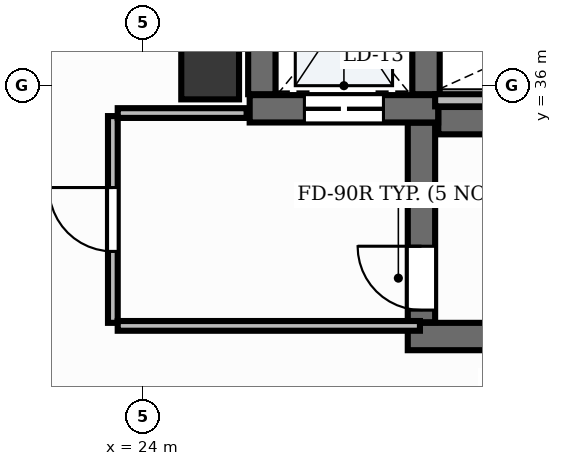
"""IFC4 building model, lengths in metres.
Left out: names, types, materials, properties, quantities, classifications, styles, units other than length and angle.
Written with IfcOpenShell. Run it as: python <this file> out.ifc"""

import sys

from ifc_helpers import new_model, si_unit, direction, frame, frame_2d, origin, origin_2d, place, context, subcontext, project, spatial, rectangle, extrude, element, fill, save


model = new_model("IFC4")
c1 = context("Model", 3, precision=1e-05, world=origin(), true_north=direction((0.0, 1.0)))
c2 = subcontext(c1, "Body", "Model", "MODEL_VIEW")
j1 = project(units=[si_unit("LENGTHUNIT", "METRE"), si_unit("PLANEANGLEUNIT", "RADIAN")], contexts=[c1])
p1 = place(None, origin())
s1 = spatial("IfcSite", under=j1, at=p1, CompositionType="ELEMENT")
p2 = place(p1, origin())
s2 = spatial("IfcBuilding", under=s1, at=p2, CompositionType="ELEMENT")
p3 = place(p2, frame((0.0, 0.0, 15.0)))
s3 = spatial("IfcBuildingStorey", under=s2, at=p3, CompositionType="ELEMENT", Elevation=15.0)
p4 = place(p3, frame((28.852, 35.425, 0.0), z_axis=(0.0, 0.0, 1.0), x_axis=(1.0, 0.0, 0.0)))
e1 = element("IfcWall", 1, at=p4, inside=s3, PredefinedType="SHEAR", context=c2, shape_type="SweptSolid", body=[
    extrude(rectangle(XDim=8.248, YDim=0.45, at=frame_2d((4.124, 0.0))), origin(), (0.0, 0.0, 1.0), 5.05),
])
p5 = place(p3, frame((28.35, 31.875, 0.0), z_axis=(0.0, 0.0, 1.0), x_axis=(1.0, 0.0, 0.0)))
e2 = element("IfcWall", 2, at=p5, inside=s3, PredefinedType="SHEAR", context=c2, shape_type="SweptSolid", body=[
    extrude(rectangle(XDim=8.75, YDim=0.45, at=frame_2d((4.375, 0.0))), origin(), (0.0, 0.0, 1.0), 5.05),
])
p6 = place(p3, frame((28.575, 32.11, 0.0), z_axis=(0.0, 0.0, 1.0), x_axis=(0.0, 1.0, 0.0)))
e3 = element("IfcWall", 3, at=p6, inside=s3, PredefinedType="SHEAR", context=c2, shape_type="SweptSolid", body=[
    extrude(rectangle(XDim=3.283, YDim=0.45, at=frame_2d((1.642, 0.0))), origin(), (0.0, 0.0, 1.0), 5.05),
])
p7 = place(p6, frame((0.2, 0.0, 0.0)))
e4 = element("IfcOpeningElement", 4, at=p7, cuts=e3, PredefinedType="OPENING", context=c2, shape_type="SweptSolid", body=[
    extrude(rectangle(XDim=1.05, YDim=2.15, at=frame_2d((0.525, 1.075))), frame((0.0, 0.24, 0.0), z_axis=(0.0, -1.0, 0.0), x_axis=(1.0, 0.0, 0.0)), (0.0, 0.0, 1.0), 0.48),
])
p8 = place(p3, frame((25.75, 35.62, 0.0), z_axis=(0.0, 0.0, 1.0), x_axis=(1.0, 0.0, 0.0)))
e5 = element("IfcWall", 5, at=p8, inside=s3, PredefinedType="SHEAR", context=c2, shape_type="SweptSolid", body=[
    extrude(rectangle(XDim=3.1, YDim=0.45, at=frame_2d((1.55, 0.0))), origin(), (0.0, 0.0, 1.0), 5.05),
])
p9 = place(p8, frame((0.9, 0.0, 0.0)))
e6 = element("IfcOpeningElement", 6, at=p9, cuts=e5, PredefinedType="OPENING", context=c2, shape_type="SweptSolid", body=[
    extrude(rectangle(XDim=1.3, YDim=2.2, at=frame_2d((0.65, 1.1))), frame((0.0, 0.24, 0.0), z_axis=(0.0, -1.0, 0.0), x_axis=(1.0, 0.0, 0.0)), (0.0, 0.0, 1.0), 0.48),
])
for number, where, z_axis, x_axis in (
    (7, (25.95, 35.86, 0.0), (0.0, 0.0, 1.0), (0.0, 1.0, 0.0)),
    (8, (28.65, 35.86, 0.0), (0.0, 0.0, 1.0), (0.0, 1.0, 0.0)),
):
    element("IfcWall", number, at=place(p3, frame(where, z_axis=z_axis, x_axis=x_axis)), inside=s3, PredefinedType="SHEAR", context=c2, shape_type="SweptSolid", body=[
        extrude(rectangle(XDim=2.7, YDim=0.45, at=frame_2d((1.35, 0.0))), origin(), (0.0, 0.0, 1.0), 5.05),
    ])
p10 = place(p3, frame((25.1, 36.25, -0.0), z_axis=(0.0, 0.0, 1.0), x_axis=(1.0, 0.0, 0.0)))
e9 = element("IfcColumn", 9, at=p10, inside=s3, PredefinedType="PILASTER", context=c2, shape_type="SweptSolid", body=[
    extrude(rectangle(XDim=0.95, YDim=0.95, at=origin_2d()), origin(), (0.0, 0.0, 1.0), 5.051),
])
p11 = place(p3, frame((28.8, 35.76, 0.0), z_axis=(0.0, 0.0, 1.0), x_axis=(1.0, 0.0, 0.0)))
e10 = element("IfcWall", 10, at=p11, inside=s3, PredefinedType="PARTITIONING", context=c2, shape_type="SweptSolid", body=[
    extrude(rectangle(XDim=4.57, YDim=0.2, at=frame_2d((2.285, 0.0))), origin(), (0.0, 0.0, 1.0), 3.36),
])
p12 = place(p3, frame((23.5, 32.1, 0.0), z_axis=(0.0, 0.0, 1.0), x_axis=(0.0, 1.0, 0.0)))
e11 = element("IfcWall", 11, at=p12, inside=s3, PredefinedType="PARTITIONING", context=c2, shape_type="SweptSolid", body=[
    extrude(rectangle(XDim=3.4, YDim=0.16, at=frame_2d((1.7, 0.0))), origin(), (0.0, 0.0, 1.0), 3.36),
])
p13 = place(p12, frame((1.175, 0.0, 0.0)))
e12 = element("IfcOpeningElement", 12, at=p13, cuts=e11, PredefinedType="OPENING", context=c2, shape_type="SweptSolid", body=[
    extrude(rectangle(XDim=1.05, YDim=2.15, at=frame_2d((0.525, 1.075))), frame((0.0, 0.095, 0.0), z_axis=(0.0, -1.0, 0.0), x_axis=(1.0, 0.0, 0.0)), (0.0, 0.0, 1.0), 0.19),
])
p14 = place(p3, frame((23.58, 32.05, 0.0), z_axis=(0.0, 0.0, 1.0), x_axis=(1.0, 0.0, 0.0)))
e13 = element("IfcWall", 13, at=p14, inside=s3, PredefinedType="PARTITIONING", context=c2, shape_type="SweptSolid", body=[
    extrude(rectangle(XDim=4.97, YDim=0.16, at=frame_2d((2.485, 0.0))), origin(), (0.0, 0.0, 1.0), 3.36),
])
p15 = place(p3, frame((23.58, 35.55, 0.0), z_axis=(0.0, 0.0, 1.0), x_axis=(1.0, 0.0, 0.0)))
e14 = element("IfcWall", 14, at=p15, inside=s3, PredefinedType="PARTITIONING", context=c2, shape_type="SweptSolid", body=[
    extrude(rectangle(XDim=2.12, YDim=0.16, at=frame_2d((1.06, 0.0))), origin(), (0.0, 0.0, 1.0), 3.36),
])
p16 = place(p7, origin())
e15 = element("IfcDoor", 15, at=p16, inside=s3, OperationType="SINGLE_SWING_RIGHT", PredefinedType="DOOR", context=c2, shape_type="SweptSolid", body=[
    extrude(rectangle(XDim=1.05, YDim=2.15, at=frame_2d((0.525, 1.075))), frame((0.0, 0.025, 0.0), z_axis=(0.0, -1.0, 0.0), x_axis=(1.0, 0.0, 0.0)), (0.0, 0.0, 1.0), 0.05),
])
fill(e4, e15)
p17 = place(p9, origin())
e16 = element("IfcDoor", 16, at=p17, inside=s3, OperationType="DOUBLE_DOOR_SLIDING", PredefinedType="DOOR", context=c2, shape_type="SweptSolid", body=[
    extrude(rectangle(XDim=1.3, YDim=2.2, at=frame_2d((0.65, 1.1))), frame((0.0, 0.025, 0.0), z_axis=(0.0, -1.0, 0.0), x_axis=(1.0, 0.0, 0.0)), (0.0, 0.0, 1.0), 0.05),
])
fill(e6, e16)
p18 = place(p13, origin())
e17 = element("IfcDoor", 17, at=p18, inside=s3, OperationType="SINGLE_SWING_RIGHT", PredefinedType="DOOR", context=c2, shape_type="SweptSolid", body=[
    extrude(rectangle(XDim=1.05, YDim=2.15, at=frame_2d((0.525, 1.075))), frame((0.0, 0.025, 0.0), z_axis=(0.0, -1.0, 0.0), x_axis=(1.0, 0.0, 0.0)), (0.0, 0.0, 1.0), 0.05),
])
fill(e12, e17)
save(model, sys.argv[1])
